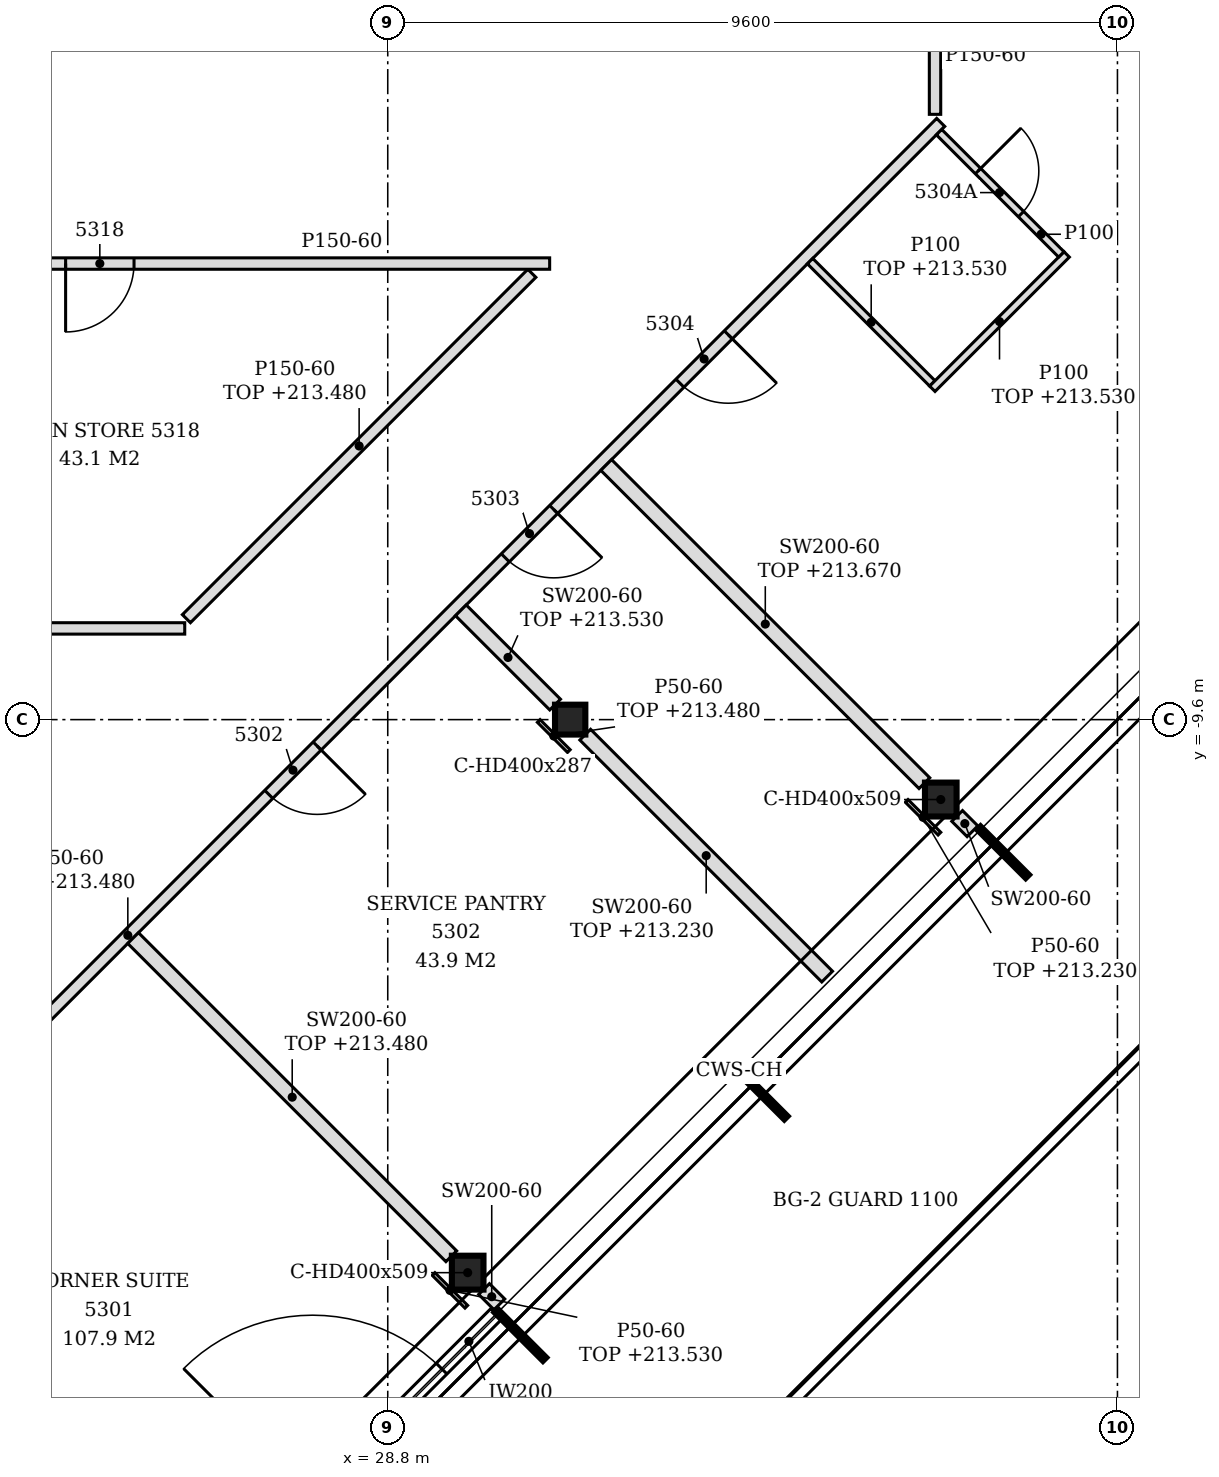
"""IFC4 building model, lengths in metres.
Left out: names, types, materials, properties, quantities, classifications, styles, units other than length and angle.
Written with IfcOpenShell. Run it as: python <this file> out.ifc"""

import sys

from ifc_helpers import new_model, si_unit, direction, frame, frame_2d, origin, origin_2d, place, context, subcontext, project, spatial, polyline, rectangle, i_section, outline, extrude, element, fill, save


model = new_model("IFC4")
c1 = context("Model", 3, precision=1e-05, world=origin(), true_north=direction((0.0, 1.0)))
c2 = subcontext(c1, "Body", "Model", "MODEL_VIEW")
j1 = project(units=[si_unit("LENGTHUNIT", "METRE"), si_unit("PLANEANGLEUNIT", "RADIAN")], contexts=[c1])
p1 = place(None, origin())
s1 = spatial("IfcSite", under=j1, at=p1, CompositionType="ELEMENT")
p2 = place(p1, origin())
s2 = spatial("IfcBuilding", under=s1, at=p2, CompositionType="ELEMENT")
p3 = place(p2, frame((0.0, 0.0, 210.6)))
s3 = spatial("IfcBuildingStorey", under=s2, at=p3, CompositionType="ELEMENT", Elevation=210.6)
for number, where, z_axis, x_axis in (
    (1, (29.852, -16.876, -0.15), (0.0, 0.0, 1.0), (1.0, 0.0, 0.0)),
    (2, (36.076, -10.652, -0.15), (0.0, 0.0, 1.0), (1.0, 0.0, 0.0)),
):
    element("IfcColumn", number, at=place(p3, frame(where, z_axis=z_axis, x_axis=x_axis)), inside=s3, PredefinedType="COLUMN", context=c2, shape_type="SweptSolid", body=[
        extrude(i_section(OverallWidth=0.416, OverallDepth=0.446, WebThickness=0.039, FlangeThickness=0.063, FilletRadius=0.015, at=origin_2d()), origin(), (0.0, 0.0, 1.0), 3.6),
    ])
p4 = place(p3, frame((31.2, -9.6, -0.15), z_axis=(0.0, 0.0, 1.0), x_axis=(1.0, 0.0, 0.0)))
e3 = element("IfcColumn", 3, at=p4, inside=s3, PredefinedType="COLUMN", context=c2, shape_type="SweptSolid", body=[
    extrude(i_section(OverallWidth=0.399, OverallDepth=0.393, WebThickness=0.023, FlangeThickness=0.037, FilletRadius=0.015, at=origin_2d()), origin(), (0.0, 0.0, 1.0), 3.6),
])
p5 = place(p3, frame((27.093, -20.553, 0.0), z_axis=(0.0, 0.0, 1.0), x_axis=(0.707079231393, 0.707134329907, 0.0)))
e4 = element("IfcWall", 4, at=p5, inside=s3, PredefinedType="NOTDEFINED", context=c2, shape_type="SweptSolid", body=[
    extrude(rectangle(XDim=4.431, YDim=0.2, at=frame_2d((2.215, 0.0))), origin(), (0.0, 0.0, 1.0), 3.45),
])
p6 = place(p5, frame((1.015, 0.0, 0.0)))
e5 = element("IfcOpeningElement", 5, at=p6, cuts=e4, PredefinedType="OPENING", context=c2, shape_type="SweptSolid", body=[
    extrude(rectangle(XDim=2.4, YDim=2.4, at=frame_2d((1.2, 1.2))), frame((0.0, 0.11, 0.0), z_axis=(0.0, -1.0, 0.0), x_axis=(1.0, 0.0, 0.0)), (0.0, 0.0, 1.0), 0.22),
])
p7 = place(p3, frame((30.269, -17.293, 0.0), z_axis=(0.0, 0.0, 1.0), x_axis=(-0.707106781187, 0.707106781187, 0.0)))
e6 = element("IfcWall", 6, at=p7, inside=s3, PredefinedType="PARTITIONING", context=c2, shape_type="SweptSolid", body=[
    extrude(rectangle(XDim=0.285, YDim=0.2, at=frame_2d((0.143, 0.0))), origin(), (0.0, 0.0, 1.0), 3.45),
])
p8 = place(p3, frame((21.146, -16.672, 0.0), z_axis=(0.0, 0.0, 1.0), x_axis=(0.707100999376, 0.70711256295, 0.0)))
e7 = element("IfcWall", 7, at=p8, inside=s3, PredefinedType="PARTITIONING", context=c2, shape_type="SweptSolid", body=[
    extrude(rectangle(XDim=21.113, YDim=0.15, at=frame_2d((10.556, 0.0))), origin(), (0.0, 0.0, 1.0), 2.88),
])
p9 = place(p8, frame((2.466, 0.0, 0.0)))
e8 = element("IfcOpeningElement", 8, at=p9, cuts=e7, PredefinedType="OPENING", context=c2, shape_type="SweptSolid", body=[
    extrude(rectangle(XDim=0.9, YDim=2.1, at=frame_2d((0.45, 1.05))), frame((0.0, 0.085, 0.0), z_axis=(0.0, -1.0, 0.0), x_axis=(1.0, 0.0, 0.0)), (0.0, 0.0, 1.0), 0.17),
])
p10 = place(p8, frame((8.611, 0.0, 0.0)))
e9 = element("IfcOpeningElement", 9, at=p10, cuts=e7, PredefinedType="OPENING", context=c2, shape_type="SweptSolid", body=[
    extrude(rectangle(XDim=0.9, YDim=2.1, at=frame_2d((0.45, 1.05))), frame((0.0, 0.085, 0.0), z_axis=(0.0, -1.0, 0.0), x_axis=(1.0, 0.0, 0.0)), (0.0, 0.0, 1.0), 0.17),
])
p11 = place(p8, frame((13.012, 0.0, 0.0)))
e10 = element("IfcOpeningElement", 10, at=p11, cuts=e7, PredefinedType="OPENING", context=c2, shape_type="SweptSolid", body=[
    extrude(rectangle(XDim=0.9, YDim=2.1, at=frame_2d((0.45, 1.05))), frame((0.0, 0.085, 0.0), z_axis=(0.0, -1.0, 0.0), x_axis=(1.0, 0.0, 0.0)), (0.0, 0.0, 1.0), 0.17),
])
p12 = place(p8, frame((16.261, 0.0, 0.0)))
e11 = element("IfcOpeningElement", 11, at=p12, cuts=e7, PredefinedType="OPENING", context=c2, shape_type="SweptSolid", body=[
    extrude(rectangle(XDim=0.9, YDim=2.1, at=frame_2d((0.45, 1.05))), frame((0.0, 0.085, 0.0), z_axis=(0.0, -1.0, 0.0), x_axis=(1.0, 0.0, 0.0)), (0.0, 0.0, 1.0), 0.17),
])
p13 = place(p3, frame((29.636, -16.66, 0.0), z_axis=(0.0, 0.0, 1.0), x_axis=(-0.707106781187, 0.707106781187, 0.0)))
e12 = element("IfcWall", 12, at=p13, inside=s3, PredefinedType="PARTITIONING", context=c2, shape_type="SweptSolid", body=[
    extrude(rectangle(XDim=5.92, YDim=0.2, at=frame_2d((2.96, 0.0))), origin(), (0.0, 0.0, 1.0), 2.88),
])
p14 = place(p3, frame((34.581, -12.981, 0.0), z_axis=(0.0, 0.0, 1.0), x_axis=(-0.707133900936, 0.707079660397, 0.0)))
e13 = element("IfcWall", 13, at=p14, inside=s3, PredefinedType="PARTITIONING", context=c2, shape_type="SweptSolid", body=[
    extrude(rectangle(XDim=4.501, YDim=0.2, at=frame_2d((2.25, 0.0))), origin(), (0.0, 0.0, 1.0), 2.63),
])
p15 = place(p3, frame((36.493, -11.069, 0.0), z_axis=(0.0, 0.0, 1.0), x_axis=(-0.707534423513, 0.706678880075, 0.0)))
e14 = element("IfcWall", 14, at=p15, inside=s3, PredefinedType="PARTITIONING", context=c2, shape_type="SweptSolid", body=[
    extrude(rectangle(XDim=0.285, YDim=0.2, at=frame_2d((0.143, 0.0))), origin(), (0.0, 0.0, 1.0), 3.45),
])
p16 = place(p3, frame((35.86, -10.436, 0.0), z_axis=(0.0, 0.0, 1.0), x_axis=(-0.707106781187, 0.707106781187, 0.0)))
e15 = element("IfcWall", 15, at=p16, inside=s3, PredefinedType="PARTITIONING", context=c2, shape_type="SweptSolid", body=[
    extrude(rectangle(XDim=5.92, YDim=0.2, at=frame_2d((2.96, 0.0))), origin(), (0.0, 0.0, 1.0), 3.07),
])
p17 = place(p3, frame((31.002, -9.402, 0.0), z_axis=(0.0, 0.0, 1.0), x_axis=(-0.707106781187, 0.707106781187, 0.0)))
e16 = element("IfcWall", 16, at=p17, inside=s3, PredefinedType="PARTITIONING", context=c2, shape_type="SweptSolid", body=[
    extrude(rectangle(XDim=1.754, YDim=0.2, at=frame_2d((0.877, 0.0))), origin(), (0.0, 0.0, 1.0), 2.93),
])
p18 = place(p3, frame((21.215, -8.4, 0.0), z_axis=(0.0, 0.0, 1.0), x_axis=(1.0, 0.0, 0.0)))
e17 = element("IfcWall", 17, at=p18, inside=s3, PredefinedType="PARTITIONING", context=c2, shape_type="SweptSolid", body=[
    extrude(rectangle(XDim=4.914, YDim=0.15, at=frame_2d((2.457, 0.0))), origin(), (0.0, 0.0, 1.0), 3.45),
])
p19 = place(p3, frame((26.151, -8.272, 0.0), z_axis=(0.0, 0.0, 1.0), x_axis=(0.707163762272, 0.707049795509, 0.0)))
e18 = element("IfcWall", 18, at=p19, inside=s3, PredefinedType="PARTITIONING", context=c2, shape_type="SweptSolid", body=[
    extrude(rectangle(XDim=6.427, YDim=0.15, at=frame_2d((3.213, 0.0))), origin(), (0.0, 0.0, 1.0), 2.88),
])
p20 = place(p3, frame((35.965, -5.177, 0.0), z_axis=(0.0, 0.0, 1.0), x_axis=(-0.707160441348, 0.707053116953, 0.0)))
e19 = element("IfcWall", 19, at=p20, inside=s3, PredefinedType="PARTITIONING", context=c2, shape_type="SweptSolid", body=[
    extrude(rectangle(XDim=2.275, YDim=0.1, at=frame_2d((1.137, 0.0))), origin(), (0.0, 0.0, 1.0), 2.93),
])
p21 = place(p3, frame((35.965, -5.247, 0.0), z_axis=(0.0, 0.0, 1.0), x_axis=(0.707155609469, 0.707057949532, 0.0)))
e20 = element("IfcWall", 20, at=p21, inside=s3, PredefinedType="PARTITIONING", context=c2, shape_type="SweptSolid", body=[
    extrude(rectangle(XDim=2.5, YDim=0.1, at=frame_2d((1.25, 0.0))), origin(), (0.0, 0.0, 1.0), 2.93),
])
p22 = place(p3, frame((19.125, -3.6, 0.0), z_axis=(0.0, 0.0, 1.0), x_axis=(1.0, 0.0, 0.0)))
e21 = element("IfcWall", 21, at=p22, inside=s3, PredefinedType="PARTITIONING", context=c2, shape_type="SweptSolid", body=[
    extrude(outline(polyline([(0.0, 0.0), (11.805, 0.0), (11.805, 3.45), (0.225, 3.45), (0.223, 2.83), (0.0, 2.83), (0.0, 0.0)])), frame((0.0, 0.075, 0.0), z_axis=(0.0, -1.0, 0.0), x_axis=(1.0, 0.0, 0.0)), (0.0, 0.0, 1.0), 0.15),
])
p23 = place(p22, frame((5.437, 0.0, 0.0)))
e22 = element("IfcOpeningElement", 22, at=p23, cuts=e21, PredefinedType="OPENING", context=c2, shape_type="SweptSolid", body=[
    extrude(rectangle(XDim=0.9, YDim=2.1, at=frame_2d((0.45, 1.05))), frame((0.0, 0.085, 0.0), z_axis=(0.0, -1.0, 0.0), x_axis=(1.0, 0.0, 0.0)), (0.0, 0.0, 1.0), 0.17),
])
p24 = place(p3, frame((37.662, -3.479, 0.0), z_axis=(0.0, 0.0, 1.0), x_axis=(-0.707160441348, 0.707053116953, 0.0)))
e23 = element("IfcWall", 23, at=p24, inside=s3, PredefinedType="PARTITIONING", context=c2, shape_type="SweptSolid", body=[
    extrude(rectangle(XDim=2.275, YDim=0.1, at=frame_2d((1.137, 0.0))), origin(), (0.0, 0.0, 1.0), 3.45),
])
p25 = place(p24, frame((0.75, 0.0, 0.0)))
e24 = element("IfcOpeningElement", 24, at=p25, cuts=e23, PredefinedType="OPENING", context=c2, shape_type="SweptSolid", body=[
    extrude(rectangle(XDim=0.8, YDim=2.1, at=frame_2d((0.4, 1.05))), frame((0.0, 0.06, 0.0), z_axis=(0.0, -1.0, 0.0), x_axis=(1.0, 0.0, 0.0)), (0.0, 0.0, 1.0), 0.12),
])
p26 = place(p3, frame((36.0, -1.637, 0.0), z_axis=(0.0, 0.0, 1.0), x_axis=(0.0, 1.0, 0.0)))
e25 = element("IfcWall", 25, at=p26, inside=s3, PredefinedType="PARTITIONING", context=c2, shape_type="SweptSolid", body=[
    extrude(outline(polyline([(0.0, 0.0), (1.537, 0.0), (1.537, 2.88), (1.532, 2.88), (1.53, 3.45), (0.0, 3.45), (0.0, 0.0)])), frame((0.0, 0.075, 0.0), z_axis=(0.0, -1.0, 0.0), x_axis=(1.0, 0.0, 0.0)), (0.0, 0.0, 1.0), 0.15),
])
p27 = place(p3, frame((29.834, -17.324, 0.0), z_axis=(0.0, 0.0, 1.0), x_axis=(-0.706906496032, 0.707307009627, 0.0)))
e26 = element("IfcWall", 26, at=p27, inside=s3, PredefinedType="PARTITIONING", context=c2, shape_type="SweptSolid", body=[
    extrude(rectangle(XDim=0.61, YDim=0.05, at=frame_2d((0.305, 0.0))), origin(), (0.0, 0.0, 1.0), 2.93),
])
p28 = place(p3, frame((31.182, -10.014, 0.0), z_axis=(0.0, 0.0, 1.0), x_axis=(-0.707106781187, 0.707106781187, 0.0)))
e27 = element("IfcWall", 27, at=p28, inside=s3, PredefinedType="PARTITIONING", context=c2, shape_type="SweptSolid", body=[
    extrude(rectangle(XDim=0.56, YDim=0.05, at=frame_2d((0.28, 0.0))), origin(), (0.0, 0.0, 1.0), 2.88),
])
p29 = place(p3, frame((36.058, -11.1, 0.0), z_axis=(0.0, 0.0, 1.0), x_axis=(-0.707307009627, 0.706906496032, 0.0)))
e28 = element("IfcWall", 28, at=p29, inside=s3, PredefinedType="PARTITIONING", context=c2, shape_type="SweptSolid", body=[
    extrude(rectangle(XDim=0.61, YDim=0.05, at=frame_2d((0.305, 0.0))), origin(), (0.0, 0.0, 1.0), 2.63),
])
p30 = place(p6, origin())
e29 = element("IfcDoor", 29, at=p30, inside=s3, OperationType="SINGLE_SWING_LEFT", PredefinedType="DOOR", context=c2, shape_type="SweptSolid", body=[
    extrude(rectangle(XDim=2.4, YDim=2.4, at=frame_2d((1.2, 1.2))), frame((0.0, 0.025, 0.0), z_axis=(0.0, -1.0, 0.0), x_axis=(1.0, 0.0, 0.0)), (0.0, 0.0, 1.0), 0.05),
])
fill(e5, e29)
p31 = place(p10, frame((0.9, 0.0, 0.0), z_axis=(0.0, 0.0, 1.0), x_axis=(-1.0, 0.0, 0.0)))
e30 = element("IfcDoor", 30, at=p31, inside=s3, OperationType="SINGLE_SWING_LEFT", PredefinedType="DOOR", context=c2, shape_type="SweptSolid", body=[
    extrude(rectangle(XDim=0.9, YDim=2.1, at=frame_2d((0.45, 1.05))), frame((0.0, 0.025, 0.0), z_axis=(0.0, -1.0, 0.0), x_axis=(1.0, 0.0, 0.0)), (0.0, 0.0, 1.0), 0.05),
])
fill(e9, e30)
p32 = place(p11, frame((0.9, 0.0, 0.0), z_axis=(0.0, 0.0, 1.0), x_axis=(-1.0, 0.0, 0.0)))
e31 = element("IfcDoor", 31, at=p32, inside=s3, OperationType="SINGLE_SWING_LEFT", PredefinedType="DOOR", context=c2, shape_type="SweptSolid", body=[
    extrude(rectangle(XDim=0.9, YDim=2.1, at=frame_2d((0.45, 1.05))), frame((0.0, 0.025, 0.0), z_axis=(0.0, -1.0, 0.0), x_axis=(1.0, 0.0, 0.0)), (0.0, 0.0, 1.0), 0.05),
])
fill(e10, e31)
p33 = place(p12, frame((0.9, 0.0, 0.0), z_axis=(0.0, 0.0, 1.0), x_axis=(-1.0, 0.0, 0.0)))
e32 = element("IfcDoor", 32, at=p33, inside=s3, OperationType="SINGLE_SWING_LEFT", PredefinedType="DOOR", context=c2, shape_type="SweptSolid", body=[
    extrude(rectangle(XDim=0.9, YDim=2.1, at=frame_2d((0.45, 1.05))), frame((0.0, 0.025, 0.0), z_axis=(0.0, -1.0, 0.0), x_axis=(1.0, 0.0, 0.0)), (0.0, 0.0, 1.0), 0.05),
])
fill(e11, e32)
p34 = place(p25, frame((0.8, 0.0, 0.0), z_axis=(0.0, 0.0, 1.0), x_axis=(-1.0, 0.0, 0.0)))
e33 = element("IfcDoor", 33, at=p34, inside=s3, OperationType="SINGLE_SWING_LEFT", PredefinedType="DOOR", context=c2, shape_type="SweptSolid", body=[
    extrude(rectangle(XDim=0.8, YDim=2.1, at=frame_2d((0.4, 1.05))), frame((0.0, 0.025, 0.0), z_axis=(0.0, -1.0, 0.0), x_axis=(1.0, 0.0, 0.0)), (0.0, 0.0, 1.0), 0.05),
])
fill(e24, e33)
p35 = place(p23, frame((0.9, 0.0, 0.0), z_axis=(0.0, 0.0, 1.0), x_axis=(-1.0, 0.0, 0.0)))
e34 = element("IfcDoor", 34, at=p35, inside=s3, OperationType="SINGLE_SWING_RIGHT", PredefinedType="DOOR", context=c2, shape_type="SweptSolid", body=[
    extrude(rectangle(XDim=0.9, YDim=2.1, at=frame_2d((0.45, 1.05))), frame((0.0, 0.025, 0.0), z_axis=(0.0, -1.0, 0.0), x_axis=(1.0, 0.0, 0.0)), (0.0, 0.0, 1.0), 0.05),
])
fill(e22, e34)
save(model, sys.argv[1])
